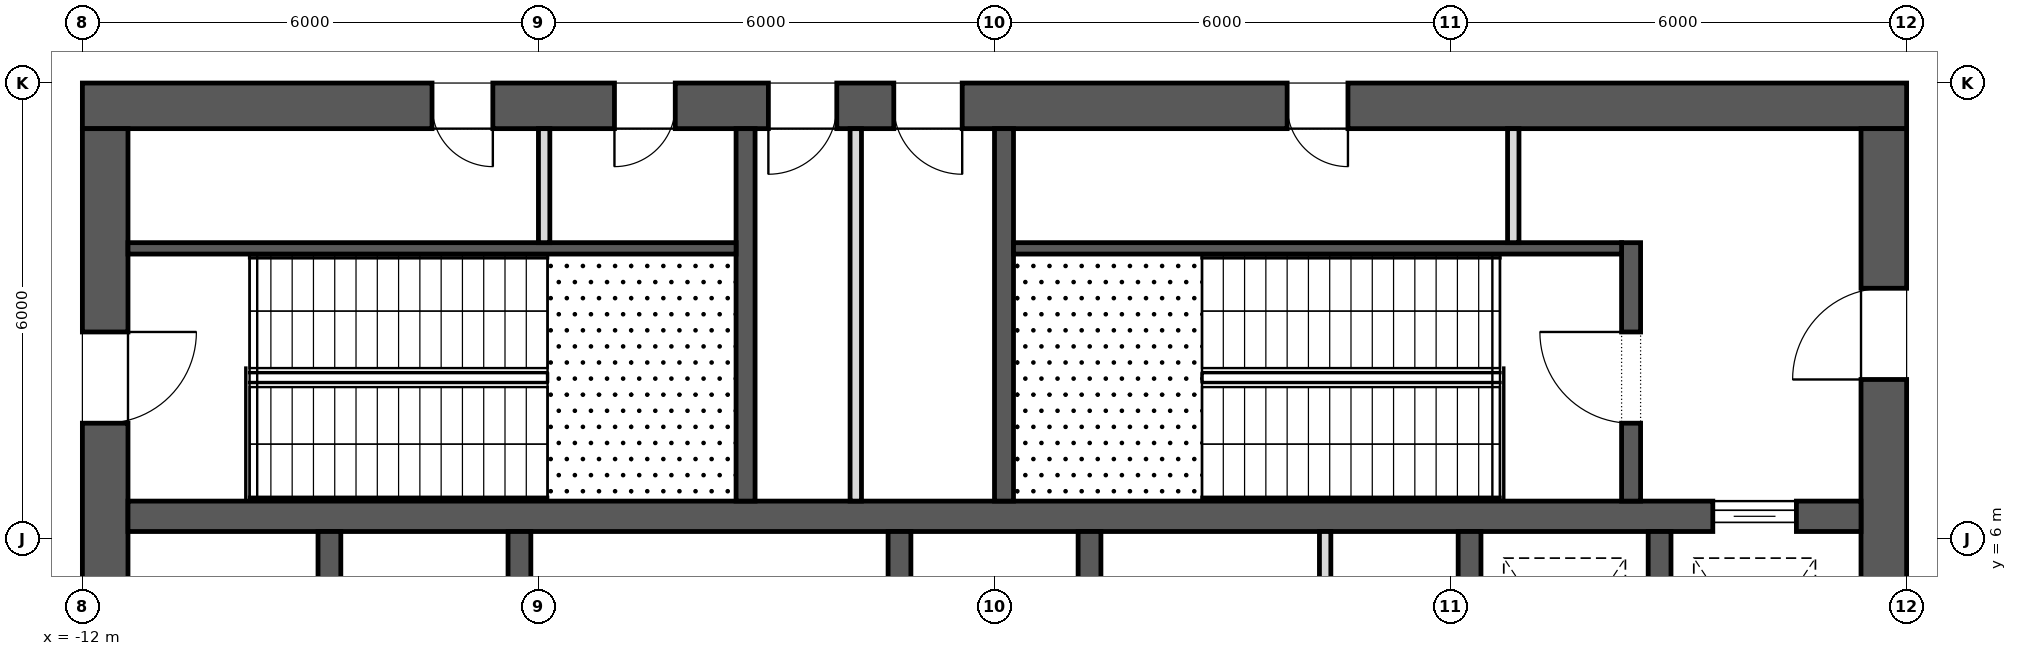
"""IFC4 building model, lengths in metres.
Left out: names, types, materials, properties, quantities, classifications, styles, units other than length and angle.
Written with IfcOpenShell. Run it as: python <this file> out.ifc"""

import sys

from ifc_helpers import new_model, si_unit, direction, frame, frame_2d, origin, place, context, subcontext, project, spatial, rectangle, extrude, element, fill, save


model = new_model("IFC4")
c1 = context("Model", 3, precision=1e-05, world=origin(), true_north=direction((0.0, 1.0)))
c2 = subcontext(c1, "Body", "Model", "MODEL_VIEW")
j1 = project(units=[si_unit("LENGTHUNIT", "METRE"), si_unit("PLANEANGLEUNIT", "RADIAN")], contexts=[c1])
p1 = place(None, origin())
s1 = spatial("IfcSite", under=j1, at=p1, CompositionType="ELEMENT")
p2 = place(p1, origin())
s2 = spatial("IfcBuilding", under=s1, at=p2, CompositionType="ELEMENT")
p3 = place(p2, frame((0.0, 0.0, 333.3)))
s3 = spatial("IfcBuildingStorey", under=s2, at=p3, CompositionType="ELEMENT", Elevation=333.3)
p4 = place(p3, frame((-12.0, 11.7, 0.0), z_axis=(0.0, 0.0, 1.0), x_axis=(1.0, 0.0, 0.0)))
e1 = element("IfcWall", 1, at=p4, inside=s3, PredefinedType="SHEAR", context=c2, shape_type="SweptSolid", body=[
    extrude(rectangle(XDim=24.0, YDim=0.6, at=frame_2d((12.0, 0.0))), origin(), (0.0, 0.0, 1.0), 5.0),
])
p5 = place(p4, frame((9.025, 0.0, 0.0)))
e2 = element("IfcOpeningElement", 2, at=p5, cuts=e1, PredefinedType="OPENING", context=c2, shape_type="SweptSolid", body=[
    extrude(rectangle(XDim=0.9, YDim=2.1, at=frame_2d((0.45, 1.05))), frame((0.0, 0.312, 0.0), z_axis=(0.0, -1.0, 0.0), x_axis=(1.0, 0.0, 0.0)), (0.0, 0.0, 1.0), 0.624),
])
p6 = place(p4, frame((10.675, 0.0, 0.0)))
e3 = element("IfcOpeningElement", 3, at=p6, cuts=e1, PredefinedType="OPENING", context=c2, shape_type="SweptSolid", body=[
    extrude(rectangle(XDim=0.9, YDim=2.1, at=frame_2d((0.45, 1.05))), frame((0.0, 0.312, 0.0), z_axis=(0.0, -1.0, 0.0), x_axis=(1.0, 0.0, 0.0)), (0.0, 0.0, 1.0), 0.624),
])
p7 = place(p4, frame((4.6, 0.0, 0.0)))
e4 = element("IfcOpeningElement", 4, at=p7, cuts=e1, PredefinedType="OPENING", context=c2, shape_type="SweptSolid", body=[
    extrude(rectangle(XDim=0.8, YDim=2.1, at=frame_2d((0.4, 1.05))), frame((0.0, 0.312, 0.0), z_axis=(0.0, -1.0, 0.0), x_axis=(1.0, 0.0, 0.0)), (0.0, 0.0, 1.0), 0.624),
])
p8 = place(p4, frame((7.0, 0.0, 0.0)))
e5 = element("IfcOpeningElement", 5, at=p8, cuts=e1, PredefinedType="OPENING", context=c2, shape_type="SweptSolid", body=[
    extrude(rectangle(XDim=0.8, YDim=2.1, at=frame_2d((0.4, 1.05))), frame((0.0, 0.312, 0.0), z_axis=(0.0, -1.0, 0.0), x_axis=(1.0, 0.0, 0.0)), (0.0, 0.0, 1.0), 0.624),
])
p9 = place(p4, frame((15.85, 0.0, 0.0)))
e6 = element("IfcOpeningElement", 6, at=p9, cuts=e1, PredefinedType="OPENING", context=c2, shape_type="SweptSolid", body=[
    extrude(rectangle(XDim=0.8, YDim=2.1, at=frame_2d((0.4, 1.05))), frame((0.0, 0.312, 0.0), z_axis=(0.0, -1.0, 0.0), x_axis=(1.0, 0.0, 0.0)), (0.0, 0.0, 1.0), 0.624),
])
p10 = place(p3, frame((11.7, -11.4, 0.0), z_axis=(0.0, 0.0, 1.0), x_axis=(0.0, 1.0, 0.0)))
e7 = element("IfcWall", 7, at=p10, inside=s3, PredefinedType="SHEAR", context=c2, shape_type="SweptSolid", body=[
    extrude(rectangle(XDim=22.8, YDim=0.6, at=frame_2d((11.4, 0.0))), origin(), (0.0, 0.0, 1.0), 5.0),
])
p11 = place(p10, frame((10.2, 0.0, 0.0)))
e8 = element("IfcOpeningElement", 8, at=p11, cuts=e7, PredefinedType="OPENING", context=c2, shape_type="SweptSolid", body=[
    extrude(rectangle(XDim=2.4, YDim=2.1, at=frame_2d((1.2, 1.05))), frame((0.0, 0.312, 0.0), z_axis=(0.0, -1.0, 0.0), x_axis=(1.0, 0.0, 0.0)), (0.0, 0.0, 1.0), 0.624),
])
p12 = place(p10, frame((19.5, 0.0, 0.0)))
e9 = element("IfcOpeningElement", 9, at=p12, cuts=e7, PredefinedType="OPENING", context=c2, shape_type="SweptSolid", body=[
    extrude(rectangle(XDim=1.2, YDim=2.1, at=frame_2d((0.6, 1.05))), frame((0.0, 0.312, 0.0), z_axis=(0.0, -1.0, 0.0), x_axis=(1.0, 0.0, 0.0)), (0.0, 0.0, 1.0), 0.624),
])
p13 = place(p10, frame((2.1, 0.0, 0.0)))
e10 = element("IfcOpeningElement", 10, at=p13, cuts=e7, PredefinedType="OPENING", context=c2, shape_type="SweptSolid", body=[
    extrude(rectangle(XDim=1.2, YDim=2.1, at=frame_2d((0.6, 1.05))), frame((0.0, 0.312, 0.0), z_axis=(0.0, -1.0, 0.0), x_axis=(1.0, 0.0, 0.0)), (0.0, 0.0, 1.0), 0.624),
])
p14 = place(p3, frame((-11.7, -11.4, 0.0), z_axis=(0.0, 0.0, 1.0), x_axis=(0.0, 1.0, 0.0)))
e11 = element("IfcWall", 11, at=p14, inside=s3, PredefinedType="SHEAR", context=c2, shape_type="SweptSolid", body=[
    extrude(rectangle(XDim=22.8, YDim=0.6, at=frame_2d((11.4, 0.0))), origin(), (0.0, 0.0, 1.0), 5.0),
])
p15 = place(p14, frame((10.2, 0.0, 0.0)))
e12 = element("IfcOpeningElement", 12, at=p15, cuts=e11, PredefinedType="OPENING", context=c2, shape_type="SweptSolid", body=[
    extrude(rectangle(XDim=2.4, YDim=2.1, at=frame_2d((1.2, 1.05))), frame((0.0, 0.312, 0.0), z_axis=(0.0, -1.0, 0.0), x_axis=(1.0, 0.0, 0.0)), (0.0, 0.0, 1.0), 0.624),
])
p16 = place(p14, frame((18.925, 0.0, 0.0)))
e13 = element("IfcOpeningElement", 13, at=p16, cuts=e11, PredefinedType="OPENING", context=c2, shape_type="SweptSolid", body=[
    extrude(rectangle(XDim=1.2, YDim=2.1, at=frame_2d((0.6, 1.05))), frame((0.0, 0.312, 0.0), z_axis=(0.0, -1.0, 0.0), x_axis=(1.0, 0.0, 0.0)), (0.0, 0.0, 1.0), 0.624),
])
p17 = place(p14, frame((2.675, 0.0, 0.0)))
e14 = element("IfcOpeningElement", 14, at=p17, cuts=e11, PredefinedType="OPENING", context=c2, shape_type="SweptSolid", body=[
    extrude(rectangle(XDim=1.2, YDim=2.1, at=frame_2d((0.6, 1.05))), frame((0.0, 0.312, 0.0), z_axis=(0.0, -1.0, 0.0), x_axis=(1.0, 0.0, 0.0)), (0.0, 0.0, 1.0), 0.624),
])
p18 = place(p3, frame((-11.4, 6.3, 0.0), z_axis=(0.0, 0.0, 1.0), x_axis=(1.0, 0.0, 0.0)))
e15 = element("IfcWall", 15, at=p18, inside=s3, PredefinedType="SHEAR", context=c2, shape_type="SweptSolid", body=[
    extrude(rectangle(XDim=22.8, YDim=0.4, at=frame_2d((11.4, 0.0))), origin(), (0.0, 0.0, 1.0), 5.0),
])
p19 = place(p18, frame((20.85, 0.0, 0.0)))
e16 = element("IfcOpeningElement", 16, at=p19, cuts=e15, PredefinedType="OPENING", context=c2, shape_type="SweptSolid", body=[
    extrude(rectangle(XDim=1.1, YDim=2.1, at=frame_2d((0.55, 1.05))), frame((0.0, 0.212, 0.0), z_axis=(0.0, -1.0, 0.0), x_axis=(1.0, 0.0, 0.0)), (0.0, 0.0, 1.0), 0.424),
])
for number, where, z_axis, x_axis in (
    (17, (-8.75, 3.2, 0.0), (0.0, 0.0, 1.0), (0.0, 1.0, 0.0)),
    (18, (-6.25, 3.2, 0.0), (0.0, 0.0, 1.0), (0.0, 1.0, 0.0)),
    (19, (-1.25, 3.2, 0.0), (0.0, 0.0, 1.0), (0.0, 1.0, 0.0)),
    (20, (1.25, 3.2, 0.0), (0.0, 0.0, 1.0), (0.0, 1.0, 0.0)),
    (21, (6.25, 3.2, 0.0), (0.0, 0.0, 1.0), (0.0, 1.0, 0.0)),
    (22, (8.75, 3.2, 0.0), (0.0, 0.0, 1.0), (0.0, 1.0, 0.0)),
):
    element("IfcWall", number, at=place(p3, frame(where, z_axis=z_axis, x_axis=x_axis)), inside=s3, PredefinedType="SHEAR", context=c2, shape_type="SweptSolid", body=[
        extrude(rectangle(XDim=2.9, YDim=0.3, at=frame_2d((1.45, 0.0))), origin(), (0.0, 0.0, 1.0), 5.0),
    ])
for number, where, z_axis, x_axis in (
    (23, (-3.275, 6.5, 0.0), (0.0, 0.0, 1.0), (0.0, 1.0, 0.0)),
    (24, (0.125, 6.5, 0.0), (0.0, 0.0, 1.0), (0.0, 1.0, 0.0)),
):
    element("IfcWall", number, at=place(p3, frame(where, z_axis=z_axis, x_axis=x_axis)), inside=s3, PredefinedType="SHEAR", context=c2, shape_type="SweptSolid", body=[
        extrude(rectangle(XDim=4.9, YDim=0.25, at=frame_2d((2.45, 0.0))), origin(), (0.0, 0.0, 1.0), 4.65),
    ])
p20 = place(p3, frame((8.375, 6.5, 0.0), z_axis=(0.0, 0.0, 1.0), x_axis=(0.0, 1.0, 0.0)))
e25 = element("IfcWall", 25, at=p20, inside=s3, PredefinedType="SHEAR", context=c2, shape_type="SweptSolid", body=[
    extrude(rectangle(XDim=3.4, YDim=0.25, at=frame_2d((1.7, 0.0))), origin(), (0.0, 0.0, 1.0), 4.65),
])
p21 = place(p20, frame((1.025, 0.0, 0.0)))
e26 = element("IfcOpeningElement", 26, at=p21, cuts=e25, PredefinedType="OPENING", context=c2, shape_type="SweptSolid", body=[
    extrude(rectangle(XDim=1.2, YDim=2.1, at=frame_2d((0.6, 1.05))), frame((0.0, 0.137, 0.0), z_axis=(0.0, -1.0, 0.0), x_axis=(1.0, 0.0, 0.0)), (0.0, 0.0, 1.0), 0.274),
])
for number, where, z_axis, x_axis in (
    (27, (-11.4, 9.825, 0.0), (0.0, 0.0, 1.0), (1.0, 0.0, 0.0)),
    (28, (0.25, 9.825, 0.0), (0.0, 0.0, 1.0), (1.0, 0.0, 0.0)),
):
    element("IfcWall", number, at=place(p3, frame(where, z_axis=z_axis, x_axis=x_axis)), inside=s3, PredefinedType="SHEAR", context=c2, shape_type="SweptSolid", body=[
        extrude(rectangle(XDim=8.0, YDim=0.15, at=frame_2d((4.0, 0.0))), origin(), (0.0, 0.0, 1.0), 4.65),
    ])
p22 = place(p3, frame((-1.825, 6.5, 0.0), z_axis=(0.0, 0.0, 1.0), x_axis=(0.0, 1.0, 0.0)))
e29 = element("IfcWall", 29, at=p22, inside=s3, PredefinedType="PARTITIONING", context=c2, shape_type="SweptSolid", body=[
    extrude(rectangle(XDim=4.9, YDim=0.15, at=frame_2d((2.45, 0.0))), origin(), (0.0, 0.0, 1.0), 4.65),
])
for number, where, z_axis, x_axis in (
    (30, (-5.925, 9.9, 0.0), (0.0, 0.0, 1.0), (0.0, 1.0, 0.0)),
    (31, (6.825, 9.9, 0.0), (0.0, 0.0, 1.0), (0.0, 1.0, 0.0)),
):
    element("IfcWall", number, at=place(p3, frame(where, z_axis=z_axis, x_axis=x_axis)), inside=s3, PredefinedType="PARTITIONING", context=c2, shape_type="SweptSolid", body=[
        extrude(rectangle(XDim=1.5, YDim=0.15, at=frame_2d((0.75, 0.0))), origin(), (0.0, 0.0, 1.0), 4.65),
    ])
p23 = place(p3, frame((4.35, 3.2, 0.0), z_axis=(0.0, 0.0, 1.0), x_axis=(0.0, 1.0, 0.0)))
e32 = element("IfcWall", 32, at=p23, inside=s3, PredefinedType="PARTITIONING", context=c2, shape_type="SweptSolid", body=[
    extrude(rectangle(XDim=2.9, YDim=0.15, at=frame_2d((1.45, 0.0))), origin(), (0.0, 0.0, 1.0), 4.65),
])
p24 = place(p19, origin())
e33 = element("IfcDoor", 33, at=p24, inside=s3, OperationType="SLIDING_TO_LEFT", PredefinedType="DOOR", context=c2, shape_type="SweptSolid", body=[
    extrude(rectangle(XDim=1.1, YDim=2.1, at=frame_2d((0.55, 1.05))), frame((0.0, 0.025, 0.0), z_axis=(0.0, -1.0, 0.0), x_axis=(1.0, 0.0, 0.0)), (0.0, 0.0, 1.0), 0.05),
])
fill(e16, e33)
p25 = place(p16, frame((1.2, 0.0, 0.0), z_axis=(0.0, 0.0, 1.0), x_axis=(-1.0, 0.0, 0.0)))
e34 = element("IfcDoor", 34, at=p25, inside=s3, OperationType="SINGLE_SWING_RIGHT", PredefinedType="DOOR", context=c2, shape_type="SweptSolid", body=[
    extrude(rectangle(XDim=1.2, YDim=2.1, at=frame_2d((0.6, 1.05))), frame((0.0, 0.025, 0.0), z_axis=(0.0, -1.0, 0.0), x_axis=(1.0, 0.0, 0.0)), (0.0, 0.0, 1.0), 0.05),
])
fill(e13, e34)
p26 = place(p21, origin())
e35 = element("IfcDoor", 35, at=p26, inside=s3, OperationType="SINGLE_SWING_LEFT", PredefinedType="DOOR", context=c2, shape_type="SweptSolid", body=[
    extrude(rectangle(XDim=1.2, YDim=2.1, at=frame_2d((0.6, 1.05))), frame((0.0, 0.025, 0.0), z_axis=(0.0, -1.0, 0.0), x_axis=(1.0, 0.0, 0.0)), (0.0, 0.0, 1.0), 0.05),
])
fill(e26, e35)
p27 = place(p12, origin())
e36 = element("IfcDoor", 36, at=p27, inside=s3, OperationType="SINGLE_SWING_RIGHT", PredefinedType="DOOR", context=c2, shape_type="SweptSolid", body=[
    extrude(rectangle(XDim=1.2, YDim=2.1, at=frame_2d((0.6, 1.05))), frame((0.0, 0.025, 0.0), z_axis=(0.0, -1.0, 0.0), x_axis=(1.0, 0.0, 0.0)), (0.0, 0.0, 1.0), 0.05),
])
fill(e9, e36)
p28 = place(p5, frame((0.9, 0.0, 0.0), z_axis=(0.0, 0.0, 1.0), x_axis=(-1.0, 0.0, 0.0)))
e37 = element("IfcDoor", 37, at=p28, inside=s3, OperationType="SINGLE_SWING_LEFT", PredefinedType="DOOR", context=c2, shape_type="SweptSolid", body=[
    extrude(rectangle(XDim=0.9, YDim=2.1, at=frame_2d((0.45, 1.05))), frame((0.0, 0.025, 0.0), z_axis=(0.0, -1.0, 0.0), x_axis=(1.0, 0.0, 0.0)), (0.0, 0.0, 1.0), 0.05),
])
fill(e2, e37)
p29 = place(p6, frame((0.9, 0.0, 0.0), z_axis=(0.0, 0.0, 1.0), x_axis=(-1.0, 0.0, 0.0)))
e38 = element("IfcDoor", 38, at=p29, inside=s3, OperationType="SINGLE_SWING_RIGHT", PredefinedType="DOOR", context=c2, shape_type="SweptSolid", body=[
    extrude(rectangle(XDim=0.9, YDim=2.1, at=frame_2d((0.45, 1.05))), frame((0.0, 0.025, 0.0), z_axis=(0.0, -1.0, 0.0), x_axis=(1.0, 0.0, 0.0)), (0.0, 0.0, 1.0), 0.05),
])
fill(e3, e38)
p30 = place(p7, frame((0.8, 0.0, 0.0), z_axis=(0.0, 0.0, 1.0), x_axis=(-1.0, 0.0, 0.0)))
e39 = element("IfcDoor", 39, at=p30, inside=s3, OperationType="SINGLE_SWING_RIGHT", PredefinedType="DOOR", context=c2, shape_type="SweptSolid", body=[
    extrude(rectangle(XDim=0.8, YDim=2.1, at=frame_2d((0.4, 1.05))), frame((0.0, 0.025, 0.0), z_axis=(0.0, -1.0, 0.0), x_axis=(1.0, 0.0, 0.0)), (0.0, 0.0, 1.0), 0.05),
])
fill(e4, e39)
p31 = place(p8, frame((0.8, 0.0, 0.0), z_axis=(0.0, 0.0, 1.0), x_axis=(-1.0, 0.0, 0.0)))
e40 = element("IfcDoor", 40, at=p31, inside=s3, OperationType="SINGLE_SWING_LEFT", PredefinedType="DOOR", context=c2, shape_type="SweptSolid", body=[
    extrude(rectangle(XDim=0.8, YDim=2.1, at=frame_2d((0.4, 1.05))), frame((0.0, 0.025, 0.0), z_axis=(0.0, -1.0, 0.0), x_axis=(1.0, 0.0, 0.0)), (0.0, 0.0, 1.0), 0.05),
])
fill(e5, e40)
p32 = place(p9, frame((0.8, 0.0, 0.0), z_axis=(0.0, 0.0, 1.0), x_axis=(-1.0, 0.0, 0.0)))
e41 = element("IfcDoor", 41, at=p32, inside=s3, OperationType="SINGLE_SWING_RIGHT", PredefinedType="DOOR", context=c2, shape_type="SweptSolid", body=[
    extrude(rectangle(XDim=0.8, YDim=2.1, at=frame_2d((0.4, 1.05))), frame((0.0, 0.025, 0.0), z_axis=(0.0, -1.0, 0.0), x_axis=(1.0, 0.0, 0.0)), (0.0, 0.0, 1.0), 0.05),
])
fill(e6, e41)
save(model, sys.argv[1])
